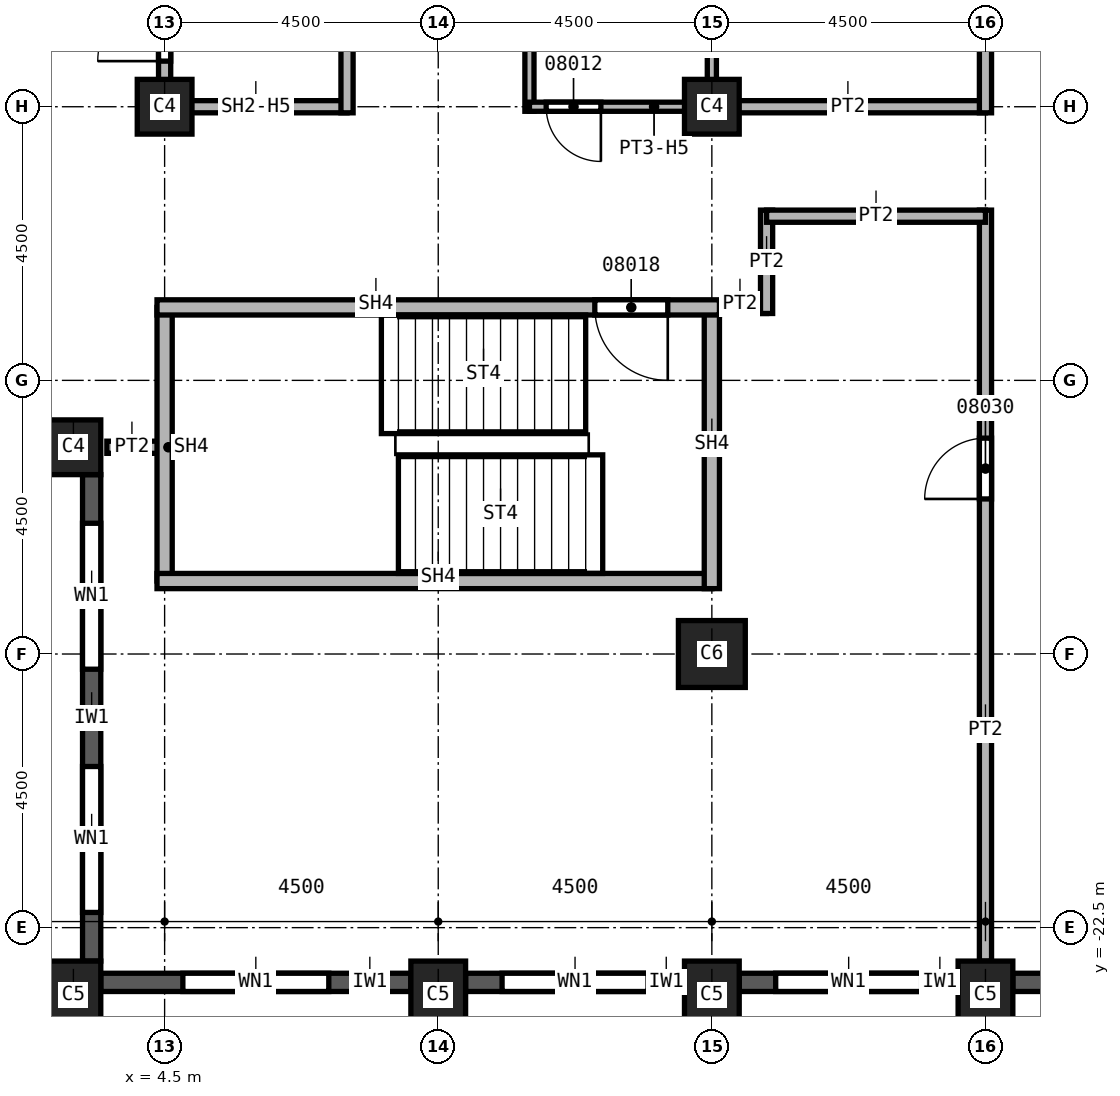
"""IFC4 building model, lengths in metres.
Left out: names, types, materials, properties, quantities, classifications, styles, units other than length and angle.
Written with IfcOpenShell. Run it as: python <this file> out.ifc"""

import sys

from ifc_helpers import new_model, si_unit, direction, frame, frame_2d, origin, origin_2d, place, context, subcontext, project, spatial, rectangle, extrude, element, fill, save


model = new_model("IFC4")
c1 = context("Model", 3, precision=1e-05, world=origin(), true_north=direction((0.0, 1.0)))
c2 = subcontext(c1, "Body", "Model", "MODEL_VIEW")
j1 = project(units=[si_unit("LENGTHUNIT", "METRE"), si_unit("PLANEANGLEUNIT", "RADIAN")], contexts=[c1])
p1 = place(None, origin())
s1 = spatial("IfcSite", under=j1, at=p1, CompositionType="ELEMENT")
p2 = place(p1, origin())
s2 = spatial("IfcBuilding", under=s1, at=p2, CompositionType="ELEMENT")
p3 = place(p2, frame((0.0, 0.0, 150.0)))
s3 = spatial("IfcBuildingStorey", under=s2, at=p3, CompositionType="ELEMENT", Elevation=150.0)
p4 = place(p3, frame((13.5, -18.0, 0.0), z_axis=(0.0, 0.0, 1.0), x_axis=(1.0, 0.0, 0.0)))
e1 = element("IfcColumn", 1, at=p4, inside=s3, PredefinedType="COLUMN", context=c2, shape_type="SweptSolid", body=[
    extrude(rectangle(XDim=1.1, YDim=1.1, at=origin_2d()), origin(), (0.0, 0.0, 1.0), 3.7),
])
for number, where, z_axis, x_axis in (
    (2, (4.5, -9.0, 0.0), (0.0, 0.0, 1.0), (1.0, 0.0, 0.0)),
    (3, (13.5, -9.0, 0.0), (0.0, 0.0, 1.0), (1.0, 0.0, 0.0)),
):
    element("IfcColumn", number, at=place(p3, frame(where, z_axis=z_axis, x_axis=x_axis)), inside=s3, PredefinedType="COLUMN", context=c2, shape_type="SweptSolid", body=[
        extrude(rectangle(XDim=0.9, YDim=0.9, at=origin_2d()), origin(), (0.0, 0.0, 1.0), 3.7),
    ])
for number, where, z_axis, x_axis in (
    (4, (3.0, -23.6, 0.0), (0.0, 0.0, 1.0), (1.0, 0.0, 0.0)),
    (5, (9.0, -23.6, 0.0), (0.0, 0.0, 1.0), (1.0, 0.0, 0.0)),
    (6, (13.5, -23.6, 0.0), (0.0, 0.0, 1.0), (1.0, 0.0, 0.0)),
    (7, (18.0, -23.6, 0.0), (0.0, 0.0, 1.0), (1.0, 0.0, 0.0)),
):
    element("IfcColumn", number, at=place(p3, frame(where, z_axis=z_axis, x_axis=x_axis)), inside=s3, PredefinedType="COLUMN", context=c2, shape_type="SweptSolid", body=[
        extrude(rectangle(XDim=0.9, YDim=1.1, at=origin_2d()), origin(), (0.0, 0.0, 1.0), 3.7),
    ])
p5 = place(p3, frame((3.0, -14.6, 0.0), z_axis=(0.0, 0.0, 1.0), x_axis=(1.0, 0.0, 0.0)))
e8 = element("IfcColumn", 8, at=p5, inside=s3, PredefinedType="COLUMN", context=c2, shape_type="SweptSolid", body=[
    extrude(rectangle(XDim=0.9, YDim=0.9, at=origin_2d()), origin(), (0.0, 0.0, 1.0), 3.7),
])
p6 = place(p3, frame((3.3, -15.05, 0.0), z_axis=(0.0, 0.0, 1.0), x_axis=(0.0, -1.0, 0.0)))
e9 = element("IfcWall", 9, at=p6, inside=s3, PredefinedType="SOLIDWALL", context=c2, shape_type="SweptSolid", body=[
    extrude(rectangle(XDim=8.0, YDim=0.3, at=frame_2d((4.0, 0.0))), origin(), (0.0, 0.0, 1.0), 3.1),
])
p7 = place(p6, frame((0.8, 0.0, 0.8)))
e10 = element("IfcOpeningElement", 10, at=p7, cuts=e9, PredefinedType="OPENING", context=c2, shape_type="SweptSolid", body=[
    extrude(rectangle(XDim=2.4, YDim=1.95, at=frame_2d((1.2, 0.975))), frame((0.0, 0.15, 0.0), z_axis=(0.0, -1.0, 0.0), x_axis=(1.0, 0.0, 0.0)), (0.0, 0.0, 1.0), 0.3),
])
p8 = place(p6, frame((4.8, 0.0, 0.8)))
e11 = element("IfcOpeningElement", 11, at=p8, cuts=e9, PredefinedType="OPENING", context=c2, shape_type="SweptSolid", body=[
    extrude(rectangle(XDim=2.4, YDim=1.95, at=frame_2d((1.2, 0.975))), frame((0.0, 0.15, 0.0), z_axis=(0.0, -1.0, 0.0), x_axis=(1.0, 0.0, 0.0)), (0.0, 0.0, 1.0), 0.3),
])
p9 = place(p3, frame((3.45, -23.4, 0.0), z_axis=(0.0, 0.0, 1.0), x_axis=(1.0, 0.0, 0.0)))
e12 = element("IfcWall", 12, at=p9, inside=s3, PredefinedType="SOLIDWALL", context=c2, shape_type="SweptSolid", body=[
    extrude(rectangle(XDim=5.1, YDim=0.3, at=frame_2d((2.55, 0.0))), origin(), (0.0, 0.0, 1.0), 3.1),
])
p10 = place(p9, frame((1.35, 0.0, 0.8)))
e13 = element("IfcOpeningElement", 13, at=p10, cuts=e12, PredefinedType="OPENING", context=c2, shape_type="SweptSolid", body=[
    extrude(rectangle(XDim=2.4, YDim=1.95, at=frame_2d((1.2, 0.975))), frame((0.0, 0.15, 0.0), z_axis=(0.0, -1.0, 0.0), x_axis=(1.0, 0.0, 0.0)), (0.0, 0.0, 1.0), 0.3),
])
p11 = place(p3, frame((9.45, -23.4, 0.0), z_axis=(0.0, 0.0, 1.0), x_axis=(1.0, 0.0, 0.0)))
e14 = element("IfcWall", 14, at=p11, inside=s3, PredefinedType="SOLIDWALL", context=c2, shape_type="SweptSolid", body=[
    extrude(rectangle(XDim=3.6, YDim=0.3, at=frame_2d((1.8, 0.0))), origin(), (0.0, 0.0, 1.0), 3.1),
])
p12 = place(p11, frame((0.6, 0.0, 0.8)))
e15 = element("IfcOpeningElement", 15, at=p12, cuts=e14, PredefinedType="OPENING", context=c2, shape_type="SweptSolid", body=[
    extrude(rectangle(XDim=2.4, YDim=1.95, at=frame_2d((1.2, 0.975))), frame((0.0, 0.15, 0.0), z_axis=(0.0, -1.0, 0.0), x_axis=(1.0, 0.0, 0.0)), (0.0, 0.0, 1.0), 0.3),
])
p13 = place(p3, frame((13.95, -23.4, 0.0), z_axis=(0.0, 0.0, 1.0), x_axis=(1.0, 0.0, 0.0)))
e16 = element("IfcWall", 16, at=p13, inside=s3, PredefinedType="SOLIDWALL", context=c2, shape_type="SweptSolid", body=[
    extrude(rectangle(XDim=3.6, YDim=0.3, at=frame_2d((1.8, 0.0))), origin(), (0.0, 0.0, 1.0), 3.1),
])
p14 = place(p13, frame((0.6, 0.0, 0.8)))
e17 = element("IfcOpeningElement", 17, at=p14, cuts=e16, PredefinedType="OPENING", context=c2, shape_type="SweptSolid", body=[
    extrude(rectangle(XDim=2.4, YDim=1.95, at=frame_2d((1.2, 0.975))), frame((0.0, 0.15, 0.0), z_axis=(0.0, -1.0, 0.0), x_axis=(1.0, 0.0, 0.0)), (0.0, 0.0, 1.0), 0.3),
])
p15 = place(p3, frame((18.45, -23.4, 0.0), z_axis=(0.0, 0.0, 1.0), x_axis=(1.0, 0.0, 0.0)))
e18 = element("IfcWall", 18, at=p15, inside=s3, PredefinedType="SOLIDWALL", context=c2, shape_type="SweptSolid", body=[
    extrude(rectangle(XDim=3.6, YDim=0.3, at=frame_2d((1.8, 0.0))), origin(), (0.0, 0.0, 1.0), 3.1),
])
p16 = place(p15, frame((0.625, 0.0, 0.8)))
e19 = element("IfcOpeningElement", 19, at=p16, cuts=e18, PredefinedType="OPENING", context=c2, shape_type="SweptSolid", body=[
    extrude(rectangle(XDim=0.6, YDim=1.95, at=frame_2d((0.3, 0.975))), frame((0.0, 0.15, 0.0), z_axis=(0.0, -1.0, 0.0), x_axis=(1.0, 0.0, 0.0)), (0.0, 0.0, 1.0), 0.3),
])
p17 = place(p15, frame((1.825, 0.0, 0.8)))
e20 = element("IfcOpeningElement", 20, at=p17, cuts=e18, PredefinedType="OPENING", context=c2, shape_type="SweptSolid", body=[
    extrude(rectangle(XDim=1.0, YDim=1.95, at=frame_2d((0.5, 0.975))), frame((0.0, 0.15, 0.0), z_axis=(0.0, -1.0, 0.0), x_axis=(1.0, 0.0, 0.0)), (0.0, 0.0, 1.0), 0.3),
])
p18 = place(p3, frame((4.5, -14.6, 0.0), z_axis=(0.0, 0.0, 1.0), x_axis=(-1.0, 0.0, 0.0)))
e21 = element("IfcWall", 21, at=p18, inside=s3, PredefinedType="PARTITIONING", context=c2, shape_type="SweptSolid", body=[
    extrude(rectangle(XDim=0.95, YDim=0.2, at=frame_2d((0.475, 0.0))), origin(), (0.0, 0.0, 1.0), 3.7),
])
p19 = place(p3, frame((13.5, -9.0, 0.0), z_axis=(0.0, 0.0, 1.0), x_axis=(1.0, 0.0, 0.0)))
e22 = element("IfcWall", 22, at=p19, inside=s3, PredefinedType="PARTITIONING", context=c2, shape_type="SweptSolid", body=[
    extrude(rectangle(XDim=4.5, YDim=0.2, at=frame_2d((2.25, 0.0))), origin(), (0.0, 0.0, 1.0), 3.7),
])
p20 = place(p3, frame((14.4, -12.3, 0.0), z_axis=(0.0, 0.0, 1.0), x_axis=(-1.0, 0.0, 0.0)))
e23 = element("IfcWall", 23, at=p20, inside=s3, PredefinedType="PARTITIONING", context=c2, shape_type="SweptSolid", body=[
    extrude(rectangle(XDim=1.025, YDim=0.2, at=frame_2d((0.512, 0.0))), origin(), (0.0, 0.0, 1.0), 3.7),
])
p21 = place(p3, frame((14.4, -10.7, 0.0), z_axis=(0.0, 0.0, 1.0), x_axis=(0.0, -1.0, 0.0)))
e24 = element("IfcWall", 24, at=p21, inside=s3, PredefinedType="PARTITIONING", context=c2, shape_type="SweptSolid", body=[
    extrude(rectangle(XDim=1.7, YDim=0.2, at=frame_2d((0.85, 0.0))), origin(), (0.0, 0.0, 1.0), 3.7),
])
p22 = place(p3, frame((18.0, -23.05, 0.0), z_axis=(0.0, 0.0, 1.0), x_axis=(0.0, 1.0, 0.0)))
e25 = element("IfcWall", 25, at=p22, inside=s3, PredefinedType="PARTITIONING", context=c2, shape_type="SweptSolid", body=[
    extrude(rectangle(XDim=12.35, YDim=0.2, at=frame_2d((6.175, 0.0))), origin(), (0.0, 0.0, 1.0), 3.7),
])
p23 = place(p22, frame((7.6, 0.0, 0.0)))
e26 = element("IfcOpeningElement", 26, at=p23, cuts=e25, PredefinedType="OPENING", context=c2, shape_type="SweptSolid", body=[
    extrude(rectangle(XDim=1.0, YDim=2.1, at=frame_2d((0.5, 1.05))), frame((0.0, 0.1, 0.0), z_axis=(0.0, -1.0, 0.0), x_axis=(1.0, 0.0, 0.0)), (0.0, 0.0, 1.0), 0.2),
])
p24 = place(p3, frame((18.0, -10.8, 0.0), z_axis=(0.0, 0.0, 1.0), x_axis=(-1.0, 0.0, 0.0)))
e27 = element("IfcWall", 27, at=p24, inside=s3, PredefinedType="PARTITIONING", context=c2, shape_type="SweptSolid", body=[
    extrude(rectangle(XDim=3.6, YDim=0.2, at=frame_2d((1.8, 0.0))), origin(), (0.0, 0.0, 1.0), 3.7),
])
p25 = place(p3, frame((18.0, -9.1, 0.0), z_axis=(0.0, 0.0, 1.0), x_axis=(0.0, 1.0, 0.0)))
e28 = element("IfcWall", 28, at=p25, inside=s3, PredefinedType="PARTITIONING", context=c2, shape_type="SweptSolid", body=[
    extrude(rectangle(XDim=18.2, YDim=0.2, at=frame_2d((9.1, 0.0))), origin(), (0.0, 0.0, 1.0), 3.7),
])
p26 = place(p25, frame((6.1, 0.0, 0.0)))
e29 = element("IfcOpeningElement", 29, at=p26, cuts=e28, PredefinedType="OPENING", context=c2, shape_type="SweptSolid", body=[
    extrude(rectangle(XDim=1.0, YDim=2.1, at=frame_2d((0.5, 1.05))), frame((0.0, 0.1, 0.0), z_axis=(0.0, -1.0, 0.0), x_axis=(1.0, 0.0, 0.0)), (0.0, 0.0, 1.0), 0.2),
])
p27 = place(p25, frame((14.2, 0.0, 0.0)))
e30 = element("IfcOpeningElement", 30, at=p27, cuts=e28, PredefinedType="OPENING", context=c2, shape_type="SweptSolid", body=[
    extrude(rectangle(XDim=1.0, YDim=2.1, at=frame_2d((0.5, 1.05))), frame((0.0, 0.1, 0.0), z_axis=(0.0, -1.0, 0.0), x_axis=(1.0, 0.0, 0.0)), (0.0, 0.0, 1.0), 0.2),
])
p28 = place(p3, frame((4.5, -9.1, 0.0), z_axis=(0.0, 0.0, 1.0), x_axis=(0.0, 1.0, 0.0)))
e31 = element("IfcWall", 31, at=p28, inside=s3, PredefinedType="SOLIDWALL", context=c2, shape_type="SweptSolid", body=[
    extrude(rectangle(XDim=9.1, YDim=0.2, at=frame_2d((4.55, 0.0))), origin(), (0.0, 0.0, 1.0), 2.938),
])
p29 = place(p28, frame((0.85, 0.0, 0.0)))
e32 = element("IfcOpeningElement", 32, at=p29, cuts=e31, PredefinedType="OPENING", context=c2, shape_type="SweptSolid", body=[
    extrude(rectangle(XDim=1.1, YDim=2.1, at=frame_2d((0.55, 1.05))), frame((0.0, 0.1, 0.0), z_axis=(0.0, -1.0, 0.0), x_axis=(1.0, 0.0, 0.0)), (0.0, 0.0, 1.0), 0.2),
])
p30 = place(p28, frame((3.35, 0.0, 0.0)))
e33 = element("IfcOpeningElement", 33, at=p30, cuts=e31, PredefinedType="OPENING", context=c2, shape_type="SweptSolid", body=[
    extrude(rectangle(XDim=1.1, YDim=2.1, at=frame_2d((0.55, 1.05))), frame((0.0, 0.1, 0.0), z_axis=(0.0, -1.0, 0.0), x_axis=(1.0, 0.0, 0.0)), (0.0, 0.0, 1.0), 0.2),
])
p31 = place(p3, frame((7.5, -9.0, 0.0), z_axis=(0.0, 0.0, 1.0), x_axis=(-1.0, 0.0, 0.0)))
e34 = element("IfcWall", 34, at=p31, inside=s3, PredefinedType="SOLIDWALL", context=c2, shape_type="SweptSolid", body=[
    extrude(rectangle(XDim=3.0, YDim=0.2, at=frame_2d((1.5, 0.0))), origin(), (0.0, 0.0, 1.0), 2.938),
])
p32 = place(p3, frame((7.5, -2.875, 0.0), z_axis=(0.0, 0.0, 1.0), x_axis=(0.0, -1.0, 0.0)))
e35 = element("IfcWall", 35, at=p32, inside=s3, PredefinedType="SOLIDWALL", context=c2, shape_type="SweptSolid", body=[
    extrude(rectangle(XDim=6.225, YDim=0.2, at=frame_2d((3.113, 0.0))), origin(), (0.0, 0.0, 1.0), 3.7),
])
p33 = place(p3, frame((4.5, -16.8, 0.0), z_axis=(0.0, 0.0, 1.0), x_axis=(0.0, 1.0, 0.0)))
e36 = element("IfcWall", 36, at=p33, inside=s3, PredefinedType="SOLIDWALL", context=c2, shape_type="SweptSolid", body=[
    extrude(rectangle(XDim=4.5, YDim=0.25, at=frame_2d((2.25, 0.0))), origin(), (0.0, 0.0, 1.0), 3.7),
])
p34 = place(p3, frame((13.5, -16.8, 0.0), z_axis=(0.0, 0.0, 1.0), x_axis=(-1.0, 0.0, 0.0)))
e37 = element("IfcWall", 37, at=p34, inside=s3, PredefinedType="SOLIDWALL", context=c2, shape_type="SweptSolid", body=[
    extrude(rectangle(XDim=9.125, YDim=0.25, at=frame_2d((4.562, 0.0))), origin(), (0.0, 0.0, 1.0), 3.7),
])
p35 = place(p3, frame((13.5, -12.3, 0.0), z_axis=(0.0, 0.0, 1.0), x_axis=(0.0, -1.0, 0.0)))
e38 = element("IfcWall", 38, at=p35, inside=s3, PredefinedType="SOLIDWALL", context=c2, shape_type="SweptSolid", body=[
    extrude(rectangle(XDim=4.625, YDim=0.25, at=frame_2d((2.312, 0.0))), origin(), (0.0, 0.0, 1.0), 3.7),
])
p36 = place(p3, frame((13.625, -12.3, 0.0), z_axis=(0.0, 0.0, 1.0), x_axis=(-1.0, 0.0, 0.0)))
e39 = element("IfcWall", 39, at=p36, inside=s3, PredefinedType="SOLIDWALL", context=c2, shape_type="SweptSolid", body=[
    extrude(rectangle(XDim=9.25, YDim=0.25, at=frame_2d((4.625, 0.0))), origin(), (0.0, 0.0, 1.0), 3.7),
])
p37 = place(p36, frame((0.85, 0.0, 0.0)))
e40 = element("IfcOpeningElement", 40, at=p37, cuts=e39, PredefinedType="OPENING", context=c2, shape_type="SweptSolid", body=[
    extrude(rectangle(XDim=1.2, YDim=2.1, at=frame_2d((0.6, 1.05))), frame((0.0, 0.125, 0.0), z_axis=(0.0, -1.0, 0.0), x_axis=(1.0, 0.0, 0.0)), (0.0, 0.0, 1.0), 0.25),
])
p38 = place(p3, frame((10.5, -6.925, 0.0), z_axis=(0.0, 0.0, 1.0), x_axis=(0.0, -1.0, 0.0)))
e41 = element("IfcWall", 41, at=p38, inside=s3, PredefinedType="PARTITIONING", context=c2, shape_type="SweptSolid", body=[
    extrude(rectangle(XDim=2.15, YDim=0.15, at=frame_2d((1.075, 0.0))), origin(), (0.0, 0.0, 1.0), 3.7),
])
p39 = place(p3, frame((13.5, -7.0, 0.0), z_axis=(0.0, 0.0, 1.0), x_axis=(0.0, -1.0, 0.0)))
e42 = element("IfcWall", 42, at=p39, inside=s3, PredefinedType="PARTITIONING", context=c2, shape_type="SweptSolid", body=[
    extrude(rectangle(XDim=2.1, YDim=0.15, at=frame_2d((1.05, 0.0))), origin(), (0.0, 0.0, 1.0), 2.938),
])
p40 = place(p3, frame((13.575, -9.0, 0.0), z_axis=(0.0, 0.0, 1.0), x_axis=(-1.0, 0.0, 0.0)))
e43 = element("IfcWall", 43, at=p40, inside=s3, PredefinedType="PARTITIONING", context=c2, shape_type="SweptSolid", body=[
    extrude(rectangle(XDim=3.075, YDim=0.15, at=frame_2d((1.538, 0.0))), origin(), (0.0, 0.0, 1.0), 2.938),
])
p41 = place(p40, frame((1.9, 0.0, 0.0)))
e44 = element("IfcOpeningElement", 44, at=p41, cuts=e43, PredefinedType="OPENING", context=c2, shape_type="SweptSolid", body=[
    extrude(rectangle(XDim=0.9, YDim=2.1, at=frame_2d((0.45, 1.05))), frame((0.0, 0.075, 0.0), z_axis=(0.0, -1.0, 0.0), x_axis=(1.0, 0.0, 0.0)), (0.0, 0.0, 1.0), 0.15),
])
p42 = place(p7, origin())
e45 = element("IfcWindow", 45, at=p42, inside=s3, PartitioningType="SINGLE_PANEL", PredefinedType="WINDOW", context=c2, shape_type="SweptSolid", body=[
    extrude(rectangle(XDim=2.4, YDim=1.95, at=frame_2d((1.2, 0.975))), frame((0.0, 0.03, 0.0), z_axis=(0.0, -1.0, 0.0), x_axis=(1.0, 0.0, 0.0)), (0.0, 0.0, 1.0), 0.06),
])
fill(e10, e45)
p43 = place(p8, origin())
e46 = element("IfcWindow", 46, at=p43, inside=s3, PartitioningType="SINGLE_PANEL", PredefinedType="WINDOW", context=c2, shape_type="SweptSolid", body=[
    extrude(rectangle(XDim=2.4, YDim=1.95, at=frame_2d((1.2, 0.975))), frame((0.0, 0.03, 0.0), z_axis=(0.0, -1.0, 0.0), x_axis=(1.0, 0.0, 0.0)), (0.0, 0.0, 1.0), 0.06),
])
fill(e11, e46)
p44 = place(p10, origin())
e47 = element("IfcWindow", 47, at=p44, inside=s3, PartitioningType="SINGLE_PANEL", PredefinedType="WINDOW", context=c2, shape_type="SweptSolid", body=[
    extrude(rectangle(XDim=2.4, YDim=1.95, at=frame_2d((1.2, 0.975))), frame((0.0, 0.03, 0.0), z_axis=(0.0, -1.0, 0.0), x_axis=(1.0, 0.0, 0.0)), (0.0, 0.0, 1.0), 0.06),
])
fill(e13, e47)
p45 = place(p12, origin())
e48 = element("IfcWindow", 48, at=p45, inside=s3, PartitioningType="SINGLE_PANEL", PredefinedType="WINDOW", context=c2, shape_type="SweptSolid", body=[
    extrude(rectangle(XDim=2.4, YDim=1.95, at=frame_2d((1.2, 0.975))), frame((0.0, 0.03, 0.0), z_axis=(0.0, -1.0, 0.0), x_axis=(1.0, 0.0, 0.0)), (0.0, 0.0, 1.0), 0.06),
])
fill(e15, e48)
p46 = place(p14, origin())
e49 = element("IfcWindow", 49, at=p46, inside=s3, PartitioningType="SINGLE_PANEL", PredefinedType="WINDOW", context=c2, shape_type="SweptSolid", body=[
    extrude(rectangle(XDim=2.4, YDim=1.95, at=frame_2d((1.2, 0.975))), frame((0.0, 0.03, 0.0), z_axis=(0.0, -1.0, 0.0), x_axis=(1.0, 0.0, 0.0)), (0.0, 0.0, 1.0), 0.06),
])
fill(e17, e49)
p47 = place(p29, origin())
e50 = element("IfcDoor", 50, at=p47, inside=s3, OperationType="SINGLE_SWING_LEFT", PredefinedType="DOOR", context=c2, shape_type="SweptSolid", body=[
    extrude(rectangle(XDim=1.1, YDim=2.1, at=frame_2d((0.55, 1.05))), frame((0.0, 0.025, 0.0), z_axis=(0.0, -1.0, 0.0), x_axis=(1.0, 0.0, 0.0)), (0.0, 0.0, 1.0), 0.05),
])
fill(e32, e50)
p48 = place(p41, origin())
e51 = element("IfcDoor", 51, at=p48, inside=s3, OperationType="SINGLE_SWING_LEFT", PredefinedType="DOOR", context=c2, shape_type="SweptSolid", body=[
    extrude(rectangle(XDim=0.9, YDim=2.1, at=frame_2d((0.45, 1.05))), frame((0.0, 0.025, 0.0), z_axis=(0.0, -1.0, 0.0), x_axis=(1.0, 0.0, 0.0)), (0.0, 0.0, 1.0), 0.05),
])
fill(e44, e51)
p49 = place(p37, origin())
e52 = element("IfcDoor", 52, at=p49, inside=s3, OperationType="SINGLE_SWING_LEFT", PredefinedType="DOOR", context=c2, shape_type="SweptSolid", body=[
    extrude(rectangle(XDim=1.2, YDim=2.1, at=frame_2d((0.6, 1.05))), frame((0.0, 0.025, 0.0), z_axis=(0.0, -1.0, 0.0), x_axis=(1.0, 0.0, 0.0)), (0.0, 0.0, 1.0), 0.05),
])
fill(e40, e52)
p50 = place(p23, origin())
e53 = element("IfcDoor", 53, at=p50, inside=s3, OperationType="SINGLE_SWING_LEFT", PredefinedType="DOOR", context=c2, shape_type="SweptSolid", body=[
    extrude(rectangle(XDim=1.0, YDim=2.1, at=frame_2d((0.5, 1.05))), frame((0.0, 0.025, 0.0), z_axis=(0.0, -1.0, 0.0), x_axis=(1.0, 0.0, 0.0)), (0.0, 0.0, 1.0), 0.05),
])
fill(e26, e53)
save(model, sys.argv[1])
